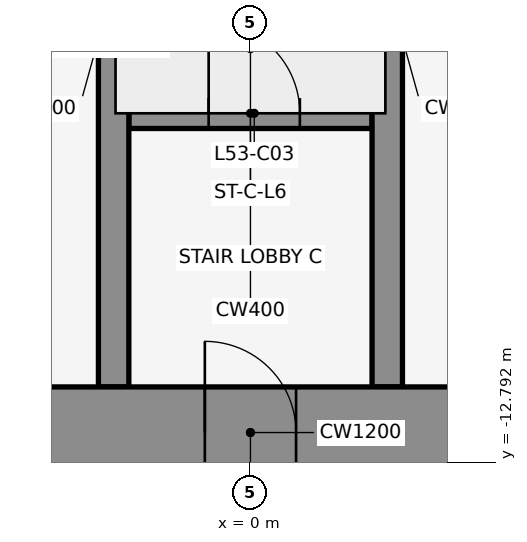
"""IFC4 building model, lengths in metres.
Left out: names, types, materials, properties, quantities, classifications, styles, units other than length and angle.
Written with IfcOpenShell. Run it as: python <this file> out.ifc"""

import sys

from ifc_helpers import new_model, si_unit, direction, frame, frame_2d, origin, place, context, subcontext, project, spatial, rectangle, extrude, element, fill, save


model = new_model("IFC4")
c1 = context("Model", 3, precision=1e-05, world=origin(), true_north=direction((0.0, 1.0)))
c2 = subcontext(c1, "Body", "Model", "MODEL_VIEW")
j1 = project(units=[si_unit("LENGTHUNIT", "METRE"), si_unit("PLANEANGLEUNIT", "RADIAN")], contexts=[c1])
p1 = place(None, origin())
s1 = spatial("IfcSite", under=j1, at=p1, CompositionType="ELEMENT")
p2 = place(p1, origin())
s2 = spatial("IfcBuilding", under=s1, at=p2, CompositionType="ELEMENT")
p3 = place(p2, frame((0.0, 0.0, 236.0)))
s3 = spatial("IfcBuildingStorey", under=s2, at=p3, CompositionType="ELEMENT", Elevation=236.0)
p4 = place(p3, frame((-1.6, -8.2, 0.0), z_axis=(0.0, 0.0, 1.0), x_axis=(1.0, 0.0, 0.0)))
e1 = element("IfcWall", 1, at=p4, inside=s3, PredefinedType="SHEAR", context=c2, shape_type="SweptSolid", body=[
    extrude(rectangle(XDim=3.2, YDim=0.4, at=frame_2d((1.6, 0.0))), origin(), (0.0, 0.0, 1.0), 5.4),
])
p5 = place(p4, frame((1.05, 0.0, 0.0)))
e2 = element("IfcOpeningElement", 2, at=p5, cuts=e1, PredefinedType="OPENING", context=c2, shape_type="SweptSolid", body=[
    extrude(rectangle(XDim=1.2, YDim=2.1, at=frame_2d((0.6, 1.05))), frame((0.0, 0.212, 0.0), z_axis=(0.0, -1.0, 0.0), x_axis=(1.0, 0.0, 0.0)), (0.0, 0.0, 1.0), 0.424),
])
for number, where, z_axis, x_axis in (
    (3, (-1.8, -11.8, 0.0), (0.0, 0.0, 1.0), (0.0, 1.0, 0.0)),
    (4, (1.8, -11.8, 0.0), (0.0, 0.0, 1.0), (0.0, 1.0, 0.0)),
):
    element("IfcWall", number, at=place(p3, frame(where, z_axis=z_axis, x_axis=x_axis)), inside=s3, PredefinedType="SHEAR", context=c2, shape_type="SweptSolid", body=[
        extrude(rectangle(XDim=10.6, YDim=0.4, at=frame_2d((5.3, 0.0))), origin(), (0.0, 0.0, 1.0), 5.4),
    ])
p6 = place(p3, frame((-22.0, -12.4, 0.0), z_axis=(0.0, 0.0, 1.0), x_axis=(1.0, 0.0, 0.0)))
e5 = element("IfcWall", 5, at=p6, inside=s3, PredefinedType="SHEAR", context=c2, shape_type="SweptSolid", body=[
    extrude(rectangle(XDim=44.0, YDim=1.2, at=frame_2d((22.0, 0.0))), origin(), (0.0, 0.0, 1.0), 5.4),
])
p7 = place(p6, frame((2.2, 0.0, 0.0)))
e6 = element("IfcOpeningElement", 6, at=p7, cuts=e5, PredefinedType="OPENING", context=c2, shape_type="SweptSolid", body=[
    extrude(rectangle(XDim=1.2, YDim=2.1, at=frame_2d((0.6, 1.05))), frame((0.0, 0.612, 0.0), z_axis=(0.0, -1.0, 0.0), x_axis=(1.0, 0.0, 0.0)), (0.0, 0.0, 1.0), 1.224),
])
p8 = place(p6, frame((21.4, 0.0, 0.0)))
e7 = element("IfcOpeningElement", 7, at=p8, cuts=e5, PredefinedType="OPENING", context=c2, shape_type="SweptSolid", body=[
    extrude(rectangle(XDim=1.2, YDim=2.1, at=frame_2d((0.6, 1.05))), frame((0.0, 0.612, 0.0), z_axis=(0.0, -1.0, 0.0), x_axis=(1.0, 0.0, 0.0)), (0.0, 0.0, 1.0), 1.224),
])
p9 = place(p6, frame((40.6, 0.0, 0.0)))
e8 = element("IfcOpeningElement", 8, at=p9, cuts=e5, PredefinedType="OPENING", context=c2, shape_type="SweptSolid", body=[
    extrude(rectangle(XDim=1.2, YDim=2.1, at=frame_2d((0.6, 1.05))), frame((0.0, 0.612, 0.0), z_axis=(0.0, -1.0, 0.0), x_axis=(1.0, 0.0, 0.0)), (0.0, 0.0, 1.0), 1.224),
])
p10 = place(p6, frame((16.0, 0.0, 0.0)))
e9 = element("IfcOpeningElement", 9, at=p10, cuts=e5, PredefinedType="OPENING", context=c2, shape_type="SweptSolid", body=[
    extrude(rectangle(XDim=1.8, YDim=2.1, at=frame_2d((0.9, 1.05))), frame((0.0, 0.612, 0.0), z_axis=(0.0, -1.0, 0.0), x_axis=(1.0, 0.0, 0.0)), (0.0, 0.0, 1.0), 1.224),
])
p11 = place(p6, frame((6.3, 0.0, 0.0)))
e10 = element("IfcOpeningElement", 10, at=p11, cuts=e5, PredefinedType="OPENING", context=c2, shape_type="SweptSolid", body=[
    extrude(rectangle(XDim=1.2, YDim=2.1, at=frame_2d((0.6, 1.05))), frame((0.0, 0.612, 0.0), z_axis=(0.0, -1.0, 0.0), x_axis=(1.0, 0.0, 0.0)), (0.0, 0.0, 1.0), 1.224),
])
p12 = place(p6, frame((26.2, 0.0, 0.0)))
e11 = element("IfcOpeningElement", 11, at=p12, cuts=e5, PredefinedType="OPENING", context=c2, shape_type="SweptSolid", body=[
    extrude(rectangle(XDim=1.8, YDim=2.1, at=frame_2d((0.9, 1.05))), frame((0.0, 0.612, 0.0), z_axis=(0.0, -1.0, 0.0), x_axis=(1.0, 0.0, 0.0)), (0.0, 0.0, 1.0), 1.224),
])
p13 = place(p6, frame((36.5, 0.0, 0.0)))
e12 = element("IfcOpeningElement", 12, at=p13, cuts=e5, PredefinedType="OPENING", context=c2, shape_type="SweptSolid", body=[
    extrude(rectangle(XDim=1.2, YDim=2.1, at=frame_2d((0.6, 1.05))), frame((0.0, 0.612, 0.0), z_axis=(0.0, -1.0, 0.0), x_axis=(1.0, 0.0, 0.0)), (0.0, 0.0, 1.0), 1.224),
])
p14 = place(p5, origin())
e13 = element("IfcDoor", 13, at=p14, inside=s3, OperationType="SINGLE_SWING_LEFT", PredefinedType="DOOR", context=c2, shape_type="SweptSolid", body=[
    extrude(rectangle(XDim=1.2, YDim=2.1, at=frame_2d((0.6, 1.05))), frame((0.0, 0.025, 0.0), z_axis=(0.0, -1.0, 0.0), x_axis=(1.0, 0.0, 0.0)), (0.0, 0.0, 1.0), 0.05),
])
fill(e2, e13)
p15 = place(p8, frame((1.2, 0.0, 0.0), z_axis=(0.0, 0.0, 1.0), x_axis=(-1.0, 0.0, 0.0)))
e14 = element("IfcDoor", 14, at=p15, inside=s3, OperationType="SINGLE_SWING_RIGHT", PredefinedType="DOOR", context=c2, shape_type="SweptSolid", body=[
    extrude(rectangle(XDim=1.2, YDim=2.1, at=frame_2d((0.6, 1.05))), frame((0.0, 0.025, 0.0), z_axis=(0.0, -1.0, 0.0), x_axis=(1.0, 0.0, 0.0)), (0.0, 0.0, 1.0), 0.05),
])
fill(e7, e14)
save(model, sys.argv[1])
